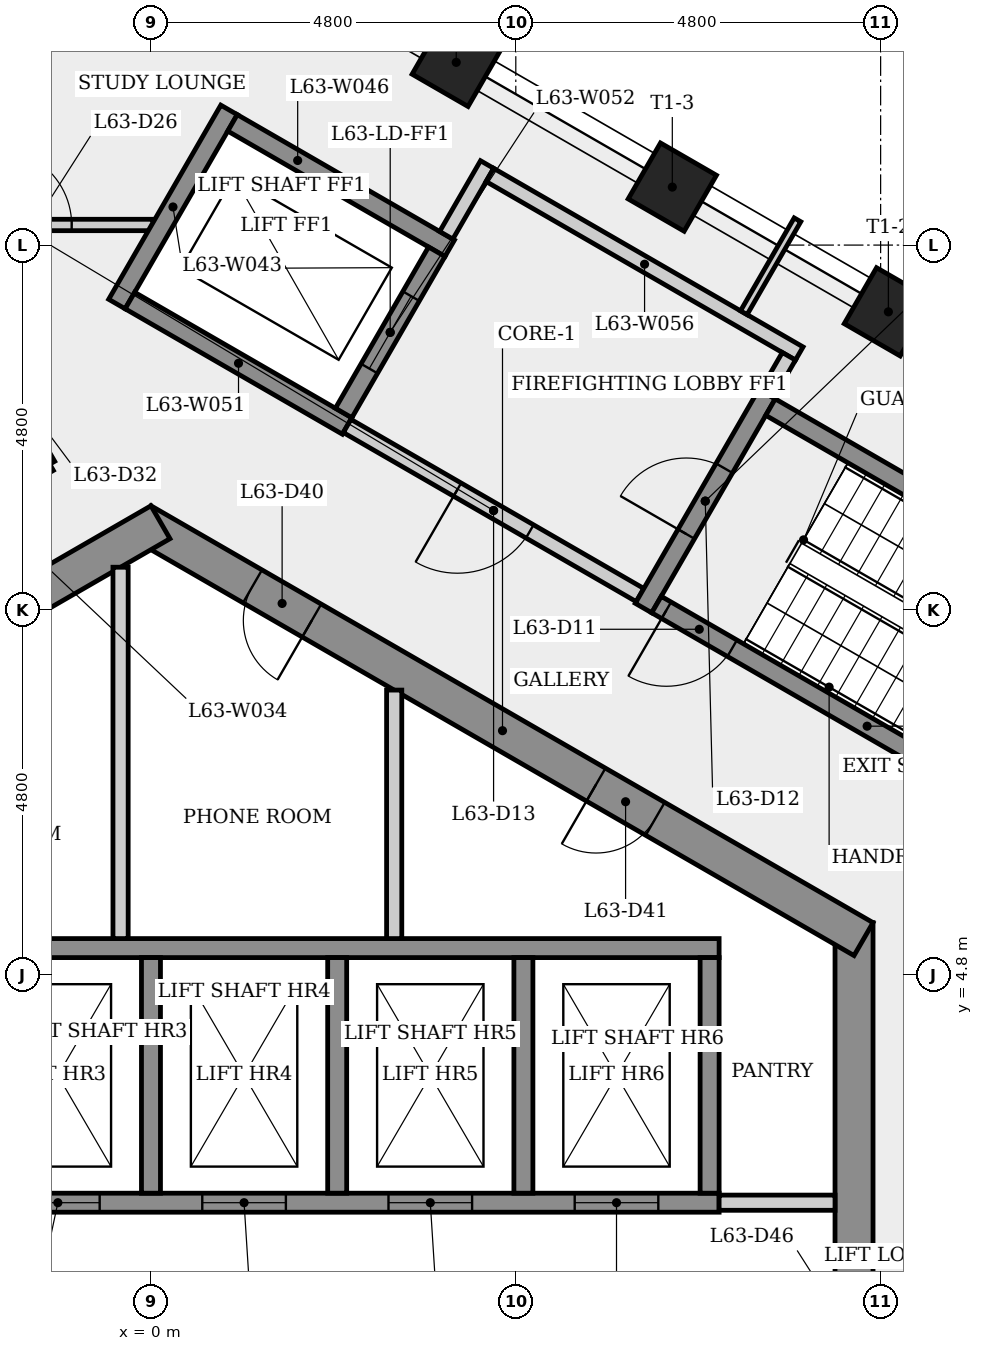
"""IFC4 building model, lengths in metres.
Left out: names, types, materials, properties, quantities, classifications, styles, units other than length and angle.
Written with IfcOpenShell. Run it as: python <this file> out.ifc"""

import sys

from ifc_helpers import new_model, si_unit, direction, frame, frame_2d, origin, origin_2d, place, context, subcontext, project, spatial, rectangle, extrude, element, fill, save


model = new_model("IFC4")
c1 = context("Model", 3, precision=1e-05, world=origin(), true_north=direction((0.0, 1.0)))
c2 = subcontext(c1, "Body", "Model", "MODEL_VIEW")
j1 = project(units=[si_unit("LENGTHUNIT", "METRE"), si_unit("PLANEANGLEUNIT", "RADIAN")], contexts=[c1])
p1 = place(None, origin())
s1 = spatial("IfcSite", under=j1, at=p1, CompositionType="ELEMENT")
p2 = place(p1, origin())
s2 = spatial("IfcBuilding", under=s1, at=p2, CompositionType="ELEMENT")
p3 = place(p2, frame((0.0, 0.0, 235.9)))
s3 = spatial("IfcBuildingStorey", under=s2, at=p3, CompositionType="ELEMENT", Elevation=235.9)
p4 = place(p3, frame((9.25, -5.485, 0.0), z_axis=(0.0, 0.0, 1.0), x_axis=(0.0, 1.0, 0.0)))
e1 = element("IfcWall", 1, at=p4, inside=s3, PredefinedType="SHEAR", context=c2, shape_type="SweptSolid", body=[
    extrude(rectangle(XDim=10.97, YDim=0.5, at=frame_2d((5.485, 0.0))), origin(), (0.0, 0.0, 1.0), 3.4),
])
p5 = place(p4, frame((4.685, 0.0, 0.0)))
e2 = element("IfcOpeningElement", 2, at=p5, cuts=e1, PredefinedType="OPENING", context=c2, shape_type="SweptSolid", body=[
    extrude(rectangle(XDim=1.6, YDim=2.1, at=frame_2d((0.8, 1.05))), frame((0.0, 0.26, 0.0), z_axis=(0.0, -1.0, 0.0), x_axis=(1.0, 0.0, 0.0)), (0.0, 0.0, 1.0), 0.52),
])
p6 = place(p3, frame((9.375, 5.268, 0.0), z_axis=(0.0, 0.0, 1.0), x_axis=(-0.866023993627, 0.500002442456, 0.0)))
e3 = element("IfcWall", 3, at=p6, inside=s3, PredefinedType="SHEAR", context=c2, shape_type="SweptSolid", body=[
    extrude(rectangle(XDim=10.97, YDim=0.5, at=frame_2d((5.485, 0.0))), origin(), (0.0, 0.0, 1.0), 3.4),
])
p7 = place(p6, frame((8.383, 0.0, 0.0)))
e4 = element("IfcOpeningElement", 4, at=p7, cuts=e3, PredefinedType="OPENING", context=c2, shape_type="SweptSolid", body=[
    extrude(rectangle(XDim=0.9, YDim=2.1, at=frame_2d((0.45, 1.05))), frame((0.0, 0.26, 0.0), z_axis=(0.0, -1.0, 0.0), x_axis=(1.0, 0.0, 0.0)), (0.0, 0.0, 1.0), 0.52),
])
p8 = place(p6, frame((3.165, 0.0, 0.0)))
e5 = element("IfcOpeningElement", 5, at=p8, cuts=e3, PredefinedType="OPENING", context=c2, shape_type="SweptSolid", body=[
    extrude(rectangle(XDim=0.9, YDim=2.1, at=frame_2d((0.45, 1.05))), frame((0.0, 0.26, 0.0), z_axis=(0.0, -1.0, 0.0), x_axis=(1.0, 0.0, 0.0)), (0.0, 0.0, 1.0), 0.52),
])
p9 = place(p3, frame((0.125, 10.753, 0.0), z_axis=(0.0, 0.0, 1.0), x_axis=(-0.866023993627, -0.500002442456, 0.0)))
e6 = element("IfcWall", 6, at=p9, inside=s3, PredefinedType="SHEAR", context=c2, shape_type="SweptSolid", body=[
    extrude(rectangle(XDim=10.97, YDim=0.5, at=frame_2d((5.485, 0.0))), origin(), (0.0, 0.0, 1.0), 3.4),
])
p10 = place(p9, frame((9.043, 0.0, 0.0)))
e7 = element("IfcOpeningElement", 7, at=p10, cuts=e6, PredefinedType="OPENING", context=c2, shape_type="SweptSolid", body=[
    extrude(rectangle(XDim=0.9, YDim=2.1, at=frame_2d((0.45, 1.05))), frame((0.0, 0.26, 0.0), z_axis=(0.0, -1.0, 0.0), x_axis=(1.0, 0.0, 0.0)), (0.0, 0.0, 1.0), 0.52),
])
p11 = place(p9, frame((2.38, 0.0, 0.0)))
e8 = element("IfcOpeningElement", 8, at=p11, cuts=e6, PredefinedType="OPENING", context=c2, shape_type="SweptSolid", body=[
    extrude(rectangle(XDim=0.9, YDim=2.1, at=frame_2d((0.45, 1.05))), frame((0.0, 0.26, 0.0), z_axis=(0.0, -1.0, 0.0), x_axis=(1.0, 0.0, 0.0)), (0.0, 0.0, 1.0), 0.52),
])
for number, where, z_axis, x_axis in (
    (9, (9.702, 13.522, 0.0), (0.0, 0.0, 1.0), (0.5, 0.866, 0.0)),
    (10, (6.859, 15.163, 0.0), (0.0, 0.0, 1.0), (0.5, 0.866, 0.0)),
    (11, (4.016, 16.804, 0.0), (0.0, 0.0, 1.0), (0.5, 0.866, 0.0)),
):
    element("IfcColumn", number, at=place(p3, frame(where, z_axis=z_axis, x_axis=x_axis)), inside=s3, PredefinedType="COLUMN", context=c2, shape_type="SweptSolid", body=[
        extrude(rectangle(XDim=0.85, YDim=0.85, at=origin_2d()), origin(), (0.0, 0.0, 1.0), 3.4),
    ])
p12 = place(p3, frame((-9.233, 6.932, 0.0), z_axis=(0.0, 0.0, 1.0), x_axis=(0.866032495305, 0.499987716925, 0.0)))
e12 = element("IfcWall", 12, at=p12, inside=s3, PredefinedType="PARTITIONING", context=c2, shape_type="SweptSolid", body=[
    extrude(rectangle(XDim=9.135, YDim=0.15, at=frame_2d((4.568, 0.0))), origin(), (0.0, 0.0, 1.0), 3.05),
])
p13 = place(p12, frame((3.28, 0.0, 0.0)))
e13 = element("IfcOpeningElement", 13, at=p13, cuts=e12, PredefinedType="OPENING", context=c2, shape_type="SweptSolid", body=[
    extrude(rectangle(XDim=0.9, YDim=2.1, at=frame_2d((0.45, 1.05))), frame((0.0, 0.085, 0.0), z_axis=(0.0, -1.0, 0.0), x_axis=(1.0, 0.0, 0.0)), (0.0, 0.0, 1.0), 0.17),
])
p14 = place(p12, frame((1.81, 0.0, 0.0)))
e14 = element("IfcOpeningElement", 14, at=p14, cuts=e12, PredefinedType="OPENING", context=c2, shape_type="SweptSolid", body=[
    extrude(rectangle(XDim=0.9, YDim=2.1, at=frame_2d((0.45, 1.05))), frame((0.0, 0.085, 0.0), z_axis=(0.0, -1.0, 0.0), x_axis=(1.0, 0.0, 0.0)), (0.0, 0.0, 1.0), 0.17),
])
p15 = place(p3, frame((-7.475, 1.8, 0.0), z_axis=(0.0, 0.0, 1.0), x_axis=(1.0, 0.0, 0.0)))
e15 = element("IfcWall", 15, at=p15, inside=s3, PredefinedType="SHEAR", context=c2, shape_type="SweptSolid", body=[
    extrude(rectangle(XDim=14.95, YDim=0.25, at=frame_2d((7.475, 0.0))), origin(), (0.0, 0.0, 1.0), 3.05),
])
p16 = place(p15, frame((0.8, 0.0, 0.0)))
e16 = element("IfcOpeningElement", 16, at=p16, cuts=e15, PredefinedType="OPENING", context=c2, shape_type="SweptSolid", body=[
    extrude(rectangle(XDim=1.1, YDim=2.1, at=frame_2d((0.55, 1.05))), frame((0.0, 0.135, 0.0), z_axis=(0.0, -1.0, 0.0), x_axis=(1.0, 0.0, 0.0)), (0.0, 0.0, 1.0), 0.27),
])
p17 = place(p15, frame((3.25, 0.0, 0.0)))
e17 = element("IfcOpeningElement", 17, at=p17, cuts=e15, PredefinedType="OPENING", context=c2, shape_type="SweptSolid", body=[
    extrude(rectangle(XDim=1.1, YDim=2.1, at=frame_2d((0.55, 1.05))), frame((0.0, 0.135, 0.0), z_axis=(0.0, -1.0, 0.0), x_axis=(1.0, 0.0, 0.0)), (0.0, 0.0, 1.0), 0.27),
])
p18 = place(p15, frame((5.7, 0.0, 0.0)))
e18 = element("IfcOpeningElement", 18, at=p18, cuts=e15, PredefinedType="OPENING", context=c2, shape_type="SweptSolid", body=[
    extrude(rectangle(XDim=1.1, YDim=2.1, at=frame_2d((0.55, 1.05))), frame((0.0, 0.135, 0.0), z_axis=(0.0, -1.0, 0.0), x_axis=(1.0, 0.0, 0.0)), (0.0, 0.0, 1.0), 0.27),
])
p19 = place(p15, frame((8.15, 0.0, 0.0)))
e19 = element("IfcOpeningElement", 19, at=p19, cuts=e15, PredefinedType="OPENING", context=c2, shape_type="SweptSolid", body=[
    extrude(rectangle(XDim=1.1, YDim=2.1, at=frame_2d((0.55, 1.05))), frame((0.0, 0.135, 0.0), z_axis=(0.0, -1.0, 0.0), x_axis=(1.0, 0.0, 0.0)), (0.0, 0.0, 1.0), 0.27),
])
p20 = place(p15, frame((10.6, 0.0, 0.0)))
e20 = element("IfcOpeningElement", 20, at=p20, cuts=e15, PredefinedType="OPENING", context=c2, shape_type="SweptSolid", body=[
    extrude(rectangle(XDim=1.1, YDim=2.1, at=frame_2d((0.55, 1.05))), frame((0.0, 0.135, 0.0), z_axis=(0.0, -1.0, 0.0), x_axis=(1.0, 0.0, 0.0)), (0.0, 0.0, 1.0), 0.27),
])
p21 = place(p15, frame((13.05, 0.0, 0.0)))
e21 = element("IfcOpeningElement", 21, at=p21, cuts=e15, PredefinedType="OPENING", context=c2, shape_type="SweptSolid", body=[
    extrude(rectangle(XDim=1.1, YDim=2.1, at=frame_2d((0.55, 1.05))), frame((0.0, 0.135, 0.0), z_axis=(0.0, -1.0, 0.0), x_axis=(1.0, 0.0, 0.0)), (0.0, 0.0, 1.0), 0.27),
])
p22 = place(p3, frame((-7.225, 5.15, 0.0), z_axis=(0.0, 0.0, 1.0), x_axis=(1.0, 0.0, 0.0)))
e22 = element("IfcWall", 22, at=p22, inside=s3, PredefinedType="SHEAR", context=c2, shape_type="SweptSolid", body=[
    extrude(rectangle(XDim=14.7, YDim=0.25, at=frame_2d((7.35, 0.0))), origin(), (0.0, 0.0, 1.0), 3.05),
])
p23 = place(p3, frame((-3.224, 14.665, 0.0), z_axis=(0.0, 0.0, 1.0), x_axis=(1.0, 0.0, 0.0)))
e23 = element("IfcWall", 23, at=p23, inside=s3, PredefinedType="PARTITIONING", context=c2, shape_type="SweptSolid", body=[
    extrude(rectangle(XDim=3.252, YDim=0.15, at=frame_2d((1.626, 0.0))), origin(), (0.0, 0.0, 1.0), 3.05),
])
p24 = place(p23, frame((1.181, 0.0, 0.0)))
e24 = element("IfcOpeningElement", 24, at=p24, cuts=e23, PredefinedType="OPENING", context=c2, shape_type="SweptSolid", body=[
    extrude(rectangle(XDim=1.0, YDim=2.1, at=frame_2d((0.5, 1.05))), frame((0.0, 0.085, 0.0), z_axis=(0.0, -1.0, 0.0), x_axis=(1.0, 0.0, 0.0)), (0.0, 0.0, 1.0), 0.17),
])
p25 = place(p3, frame((-1.488, 11.788, 0.0), z_axis=(0.0, 0.0, 1.0), x_axis=(0.499835134068, -0.866120568253, 0.0)))
e25 = element("IfcWall", 25, at=p25, inside=s3, PredefinedType="PARTITIONING", context=c2, shape_type="SweptSolid", body=[
    extrude(rectangle(XDim=0.312, YDim=0.15, at=frame_2d((0.156, 0.0))), origin(), (0.0, 0.0, 1.0), 3.05),
])
p26 = place(p3, frame((-0.4, 10.161, 0.0), z_axis=(0.0, 0.0, 1.0), x_axis=(0.0, -1.0, 0.0)))
e26 = element("IfcWall", 26, at=p26, inside=s3, PredefinedType="PARTITIONING", context=c2, shape_type="SweptSolid", body=[
    extrude(rectangle(XDim=4.886, YDim=0.2, at=frame_2d((2.443, 0.0))), origin(), (0.0, 0.0, 1.0), 3.05),
])
p27 = place(p3, frame((-0.448, 13.624, 0.0), z_axis=(0.0, 0.0, 1.0), x_axis=(0.500037662692, 0.866003658127, 0.0)))
e27 = element("IfcWall", 27, at=p27, inside=s3, PredefinedType="SHEAR", context=c2, shape_type="SweptSolid", body=[
    extrude(rectangle(XDim=2.95, YDim=0.25, at=frame_2d((1.475, 0.0))), origin(), (0.0, 0.0, 1.0), 3.05),
])
p28 = place(p3, frame((0.0, 5.025, 0.0), z_axis=(0.0, 0.0, 1.0), x_axis=(0.0, -1.0, 0.0)))
e28 = element("IfcWall", 28, at=p28, inside=s3, PredefinedType="SHEAR", context=c2, shape_type="SweptSolid", body=[
    extrude(rectangle(XDim=3.1, YDim=0.25, at=frame_2d((1.55, 0.0))), origin(), (0.0, 0.0, 1.0), 3.4),
])
p29 = place(p3, frame((1.073, 16.008, 0.0), z_axis=(0.0, 0.0, 1.0), x_axis=(0.866040211805, -0.499974350878, 0.0)))
e29 = element("IfcWall", 29, at=p29, inside=s3, PredefinedType="SHEAR", context=c2, shape_type="SweptSolid", body=[
    extrude(rectangle(XDim=3.3, YDim=0.25, at=frame_2d((1.65, 0.0))), origin(), (0.0, 0.0, 1.0), 3.05),
])
p30 = place(p3, frame((2.45, 5.025, 0.0), z_axis=(0.0, 0.0, 1.0), x_axis=(0.0, -1.0, 0.0)))
e30 = element("IfcWall", 30, at=p30, inside=s3, PredefinedType="SHEAR", context=c2, shape_type="SweptSolid", body=[
    extrude(rectangle(XDim=3.1, YDim=0.25, at=frame_2d((1.55, 0.0))), origin(), (0.0, 0.0, 1.0), 3.4),
])
p31 = place(p3, frame((2.581, 12.02, 0.0), z_axis=(0.0, 0.0, 1.0), x_axis=(-0.866040211805, 0.499974350878, 0.0)))
e31 = element("IfcWall", 31, at=p31, inside=s3, PredefinedType="SHEAR", context=c2, shape_type="SweptSolid", body=[
    extrude(rectangle(XDim=3.3, YDim=0.25, at=frame_2d((1.65, 0.0))), origin(), (0.0, 0.0, 1.0), 3.05),
])
p32 = place(p3, frame((2.535, 12.191, 0.0), z_axis=(0.0, 0.0, 1.0), x_axis=(0.500061746146, 0.865989751695, 0.0)))
e32 = element("IfcWall", 32, at=p32, inside=s3, PredefinedType="SHEAR", context=c2, shape_type="SweptSolid", body=[
    extrude(rectangle(XDim=2.45, YDim=0.25, at=frame_2d((1.225, 0.0))), origin(), (0.0, 0.0, 1.0), 3.4),
])
p33 = place(p32, frame((0.675, 0.0, 0.0)))
e33 = element("IfcOpeningElement", 33, at=p33, cuts=e32, PredefinedType="OPENING", context=c2, shape_type="SweptSolid", body=[
    extrude(rectangle(XDim=1.1, YDim=2.1, at=frame_2d((0.55, 1.05))), frame((0.0, 0.135, 0.0), z_axis=(0.0, -1.0, 0.0), x_axis=(1.0, 0.0, 0.0)), (0.0, 0.0, 1.0), 0.27),
])
p34 = place(p3, frame((3.2, 8.545, 0.0), z_axis=(0.0, 0.0, 1.0), x_axis=(0.0, -1.0, 0.0)))
e34 = element("IfcWall", 34, at=p34, inside=s3, PredefinedType="PARTITIONING", context=c2, shape_type="SweptSolid", body=[
    extrude(rectangle(XDim=3.27, YDim=0.2, at=frame_2d((1.635, 0.0))), origin(), (0.0, 0.0, 1.0), 3.05),
])
p35 = place(p3, frame((3.885, 14.529, 0.0), z_axis=(0.0, 0.0, 1.0), x_axis=(0.499997628298, 0.866026773083, 0.0)))
e35 = element("IfcWall", 35, at=p35, inside=s3, PredefinedType="PARTITIONING", context=c2, shape_type="SweptSolid", body=[
    extrude(rectangle(XDim=1.075, YDim=0.2, at=frame_2d((0.538, 0.0))), origin(), (0.0, 0.0, 1.0), 3.05),
])
p36 = place(p3, frame((4.459, 15.323, 0.0), z_axis=(0.0, 0.0, 1.0), x_axis=(0.866016039709, -0.500016218704, 0.0)))
e36 = element("IfcWall", 36, at=p36, inside=s3, PredefinedType="PARTITIONING", context=c2, shape_type="SweptSolid", body=[
    extrude(rectangle(XDim=4.7, YDim=0.2, at=frame_2d((2.35, 0.0))), origin(), (0.0, 0.0, 1.0), 3.05),
])
p37 = place(p3, frame((4.9, 5.025, 0.0), z_axis=(0.0, 0.0, 1.0), x_axis=(0.0, -1.0, 0.0)))
e37 = element("IfcWall", 37, at=p37, inside=s3, PredefinedType="SHEAR", context=c2, shape_type="SweptSolid", body=[
    extrude(rectangle(XDim=3.1, YDim=0.25, at=frame_2d((1.55, 0.0))), origin(), (0.0, 0.0, 1.0), 3.4),
])
p38 = place(p3, frame((6.435, 9.795, 0.0), z_axis=(0.0, 0.0, 1.0), x_axis=(-0.866012907634, 0.500021643343, 0.0)))
e38 = element("IfcWall", 38, at=p38, inside=s3, PredefinedType="PARTITIONING", context=c2, shape_type="SweptSolid", body=[
    extrude(rectangle(XDim=4.45, YDim=0.2, at=frame_2d((2.225, 0.0))), origin(), (0.0, 0.0, 1.0), 3.05),
])
p39 = place(p38, frame((1.675, 0.0, 0.0)))
e39 = element("IfcOpeningElement", 39, at=p39, cuts=e38, PredefinedType="OPENING", context=c2, shape_type="SweptSolid", body=[
    extrude(rectangle(XDim=1.1, YDim=2.1, at=frame_2d((0.55, 1.05))), frame((0.0, 0.11, 0.0), z_axis=(0.0, -1.0, 0.0), x_axis=(1.0, 0.0, 0.0)), (0.0, 0.0, 1.0), 0.22),
])
p40 = place(p3, frame((6.48, 9.624, 0.0), z_axis=(0.0, 0.0, 1.0), x_axis=(0.500017246033, 0.866015446554, 0.0)))
e40 = element("IfcWall", 40, at=p40, inside=s3, PredefinedType="SHEAR", context=c2, shape_type="SweptSolid", body=[
    extrude(rectangle(XDim=3.25, YDim=0.25, at=frame_2d((1.625, 0.0))), origin(), (0.0, 0.0, 1.0), 3.05),
])
p41 = place(p40, frame((1.125, 0.0, 0.0)))
e41 = element("IfcOpeningElement", 41, at=p41, cuts=e40, PredefinedType="OPENING", context=c2, shape_type="SweptSolid", body=[
    extrude(rectangle(XDim=1.0, YDim=2.1, at=frame_2d((0.5, 1.05))), frame((0.0, 0.135, 0.0), z_axis=(0.0, -1.0, 0.0), x_axis=(1.0, 0.0, 0.0)), (0.0, 0.0, 1.0), 0.27),
])
p42 = place(p3, frame((7.475, 1.8, 0.0), z_axis=(0.0, 0.0, 1.0), x_axis=(1.0, 0.0, 0.0)))
e42 = element("IfcWall", 42, at=p42, inside=s3, PredefinedType="PARTITIONING", context=c2, shape_type="SweptSolid", body=[
    extrude(rectangle(XDim=1.525, YDim=0.2, at=frame_2d((0.763, 0.0))), origin(), (0.0, 0.0, 1.0), 3.05),
])
p43 = place(p3, frame((7.35, 5.025, 0.0), z_axis=(0.0, 0.0, 1.0), x_axis=(0.0, -1.0, 0.0)))
e43 = element("IfcWall", 43, at=p43, inside=s3, PredefinedType="SHEAR", context=c2, shape_type="SweptSolid", body=[
    extrude(rectangle(XDim=3.1, YDim=0.25, at=frame_2d((1.55, 0.0))), origin(), (0.0, 0.0, 1.0), 3.4),
])
p44 = place(p3, frame((7.8, 13.51, 0.0), z_axis=(0.0, 0.0, 1.0), x_axis=(0.499951990857, 0.866053120102, 0.0)))
e44 = element("IfcWall", 44, at=p44, inside=s3, PredefinedType="PARTITIONING", context=c2, shape_type="SweptSolid", body=[
    extrude(rectangle(XDim=1.412, YDim=0.1, at=frame_2d((0.706, 0.0))), origin(), (0.0, 0.0, 1.0), 3.05),
])
p45 = place(p3, frame((8.151, 12.268, 0.0), z_axis=(0.0, 0.0, 1.0), x_axis=(0.866025499775, -0.499999833739, 0.0)))
e45 = element("IfcWall", 45, at=p45, inside=s3, PredefinedType="SHEAR", context=c2, shape_type="SweptSolid", body=[
    extrude(rectangle(XDim=6.4, YDim=0.25, at=frame_2d((3.2, 0.0))), origin(), (0.0, 0.0, 1.0), 3.05),
])
p46 = place(p3, frame((8.393, 12.937, 0.0), z_axis=(0.0, 0.0, 1.0), x_axis=(-0.500065409566, -0.86598763626, 0.0)))
e46 = element("IfcWall", 46, at=p46, inside=s3, PredefinedType="PARTITIONING", context=c2, shape_type="SweptSolid", body=[
    extrude(rectangle(XDim=0.575, YDim=0.2, at=frame_2d((0.288, 0.0))), origin(), (0.0, 0.0, 1.0), 3.05),
])
p47 = place(p3, frame((12.194, 6.47, 0.0), z_axis=(0.0, 0.0, 1.0), x_axis=(-0.866025499775, 0.499999833739, 0.0)))
e47 = element("IfcWall", 47, at=p47, inside=s3, PredefinedType="SHEAR", context=c2, shape_type="SweptSolid", body=[
    extrude(rectangle(XDim=6.4, YDim=0.25, at=frame_2d((3.2, 0.0))), origin(), (0.0, 0.0, 1.0), 3.05),
])
p48 = place(p47, frame((5.25, 0.0, 0.0)))
e48 = element("IfcOpeningElement", 48, at=p48, cuts=e47, PredefinedType="OPENING", context=c2, shape_type="SweptSolid", body=[
    extrude(rectangle(XDim=1.0, YDim=2.1, at=frame_2d((0.5, 1.05))), frame((0.0, 0.135, 0.0), z_axis=(0.0, -1.0, 0.0), x_axis=(1.0, 0.0, 0.0)), (0.0, 0.0, 1.0), 0.27),
])
p49 = place(p18, origin())
e49 = element("IfcDoor", 49, at=p49, inside=s3, OperationType="SLIDING_TO_LEFT", PredefinedType="DOOR", context=c2, shape_type="SweptSolid", body=[
    extrude(rectangle(XDim=1.1, YDim=2.1, at=frame_2d((0.55, 1.05))), frame((0.0, 0.025, 0.0), z_axis=(0.0, -1.0, 0.0), x_axis=(1.0, 0.0, 0.0)), (0.0, 0.0, 1.0), 0.05),
])
fill(e18, e49)
p50 = place(p19, origin())
e50 = element("IfcDoor", 50, at=p50, inside=s3, OperationType="SLIDING_TO_LEFT", PredefinedType="DOOR", context=c2, shape_type="SweptSolid", body=[
    extrude(rectangle(XDim=1.1, YDim=2.1, at=frame_2d((0.55, 1.05))), frame((0.0, 0.025, 0.0), z_axis=(0.0, -1.0, 0.0), x_axis=(1.0, 0.0, 0.0)), (0.0, 0.0, 1.0), 0.05),
])
fill(e19, e50)
p51 = place(p20, origin())
e51 = element("IfcDoor", 51, at=p51, inside=s3, OperationType="SLIDING_TO_LEFT", PredefinedType="DOOR", context=c2, shape_type="SweptSolid", body=[
    extrude(rectangle(XDim=1.1, YDim=2.1, at=frame_2d((0.55, 1.05))), frame((0.0, 0.025, 0.0), z_axis=(0.0, -1.0, 0.0), x_axis=(1.0, 0.0, 0.0)), (0.0, 0.0, 1.0), 0.05),
])
fill(e20, e51)
p52 = place(p21, origin())
e52 = element("IfcDoor", 52, at=p52, inside=s3, OperationType="SLIDING_TO_LEFT", PredefinedType="DOOR", context=c2, shape_type="SweptSolid", body=[
    extrude(rectangle(XDim=1.1, YDim=2.1, at=frame_2d((0.55, 1.05))), frame((0.0, 0.025, 0.0), z_axis=(0.0, -1.0, 0.0), x_axis=(1.0, 0.0, 0.0)), (0.0, 0.0, 1.0), 0.05),
])
fill(e21, e52)
p53 = place(p48, origin())
e53 = element("IfcDoor", 53, at=p53, inside=s3, OperationType="SINGLE_SWING_RIGHT", PredefinedType="DOOR", context=c2, shape_type="SweptSolid", body=[
    extrude(rectangle(XDim=1.0, YDim=2.1, at=frame_2d((0.5, 1.05))), frame((0.0, 0.025, 0.0), z_axis=(0.0, -1.0, 0.0), x_axis=(1.0, 0.0, 0.0)), (0.0, 0.0, 1.0), 0.05),
])
fill(e48, e53)
p54 = place(p41, origin())
e54 = element("IfcDoor", 54, at=p54, inside=s3, OperationType="SINGLE_SWING_LEFT", PredefinedType="DOOR", context=c2, shape_type="SweptSolid", body=[
    extrude(rectangle(XDim=1.0, YDim=2.1, at=frame_2d((0.5, 1.05))), frame((0.0, 0.025, 0.0), z_axis=(0.0, -1.0, 0.0), x_axis=(1.0, 0.0, 0.0)), (0.0, 0.0, 1.0), 0.05),
])
fill(e41, e54)
p55 = place(p39, origin())
e55 = element("IfcDoor", 55, at=p55, inside=s3, OperationType="SINGLE_SWING_RIGHT", PredefinedType="DOOR", context=c2, shape_type="SweptSolid", body=[
    extrude(rectangle(XDim=1.1, YDim=2.1, at=frame_2d((0.55, 1.05))), frame((0.0, 0.025, 0.0), z_axis=(0.0, -1.0, 0.0), x_axis=(1.0, 0.0, 0.0)), (0.0, 0.0, 1.0), 0.05),
])
fill(e39, e55)
p56 = place(p33, origin())
e56 = element("IfcDoor", 56, at=p56, inside=s3, OperationType="SLIDING_TO_LEFT", PredefinedType="DOOR", context=c2, shape_type="SweptSolid", body=[
    extrude(rectangle(XDim=1.1, YDim=2.1, at=frame_2d((0.55, 1.05))), frame((0.0, 0.025, 0.0), z_axis=(0.0, -1.0, 0.0), x_axis=(1.0, 0.0, 0.0)), (0.0, 0.0, 1.0), 0.05),
])
fill(e33, e56)
p57 = place(p24, origin())
e57 = element("IfcDoor", 57, at=p57, inside=s3, OperationType="SINGLE_SWING_LEFT", PredefinedType="DOOR", context=c2, shape_type="SweptSolid", body=[
    extrude(rectangle(XDim=1.0, YDim=2.1, at=frame_2d((0.5, 1.05))), frame((0.0, 0.025, 0.0), z_axis=(0.0, -1.0, 0.0), x_axis=(1.0, 0.0, 0.0)), (0.0, 0.0, 1.0), 0.05),
])
fill(e24, e57)
p58 = place(p7, origin())
e58 = element("IfcDoor", 58, at=p58, inside=s3, OperationType="SINGLE_SWING_LEFT", PredefinedType="DOOR", context=c2, shape_type="SweptSolid", body=[
    extrude(rectangle(XDim=0.9, YDim=2.1, at=frame_2d((0.45, 1.05))), frame((0.0, 0.025, 0.0), z_axis=(0.0, -1.0, 0.0), x_axis=(1.0, 0.0, 0.0)), (0.0, 0.0, 1.0), 0.05),
])
fill(e4, e58)
p59 = place(p8, origin())
e59 = element("IfcDoor", 59, at=p59, inside=s3, OperationType="SINGLE_SWING_RIGHT", PredefinedType="DOOR", context=c2, shape_type="SweptSolid", body=[
    extrude(rectangle(XDim=0.9, YDim=2.1, at=frame_2d((0.45, 1.05))), frame((0.0, 0.025, 0.0), z_axis=(0.0, -1.0, 0.0), x_axis=(1.0, 0.0, 0.0)), (0.0, 0.0, 1.0), 0.05),
])
fill(e5, e59)
save(model, sys.argv[1])
